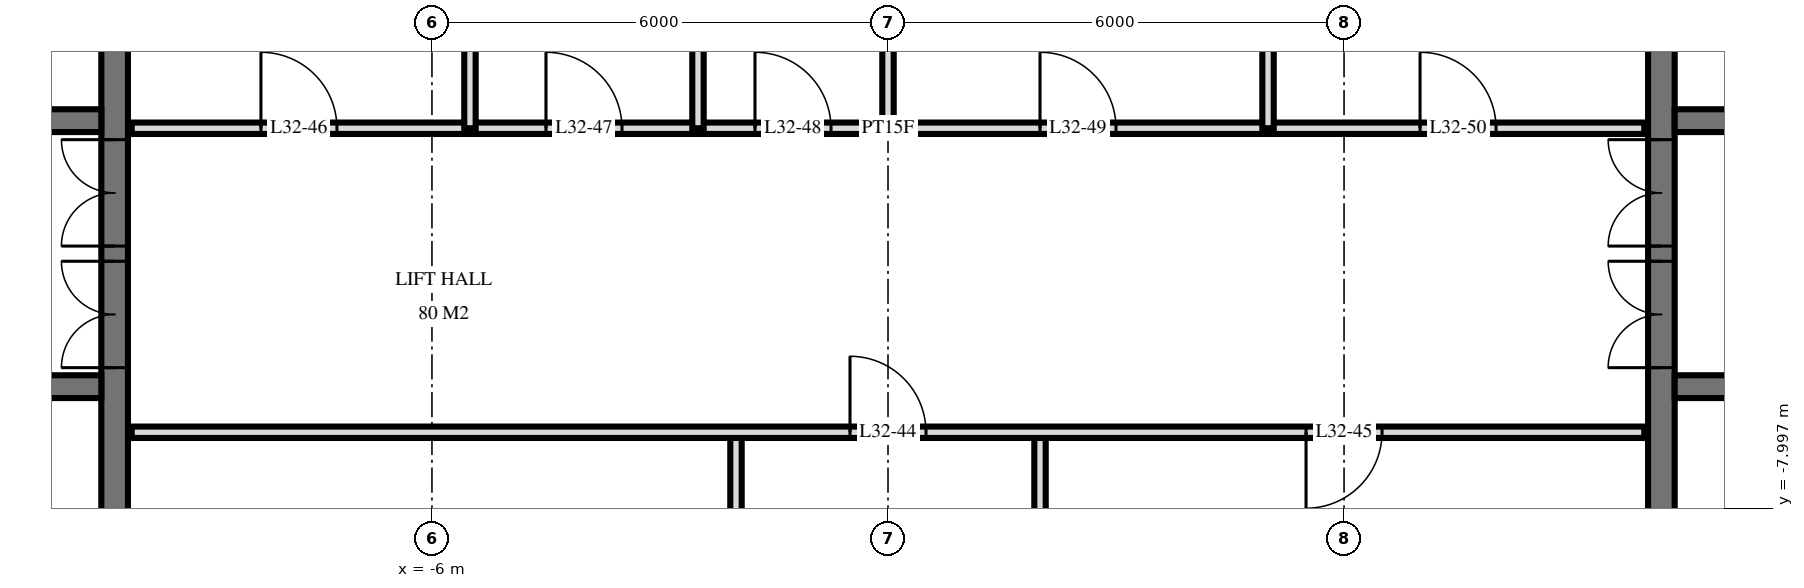
"""IFC4 building model, lengths in metres.
Left out: names, types, materials, properties, quantities, classifications, styles, units other than length and angle.
Written with IfcOpenShell. Run it as: python <this file> out.ifc"""

import sys

from ifc_helpers import new_model, si_unit, direction, frame, frame_2d, origin, place, context, subcontext, project, spatial, rectangle, extrude, element, fill, save


model = new_model("IFC4")
c1 = context("Model", 3, precision=1e-05, world=origin(), true_north=direction((0.0, 1.0)))
c2 = subcontext(c1, "Body", "Model", "MODEL_VIEW")
j1 = project(units=[si_unit("LENGTHUNIT", "METRE"), si_unit("PLANEANGLEUNIT", "RADIAN")], contexts=[c1])
p1 = place(None, origin())
s1 = spatial("IfcSite", under=j1, at=p1, CompositionType="ELEMENT")
p2 = place(p1, origin())
s2 = spatial("IfcBuilding", under=s1, at=p2, CompositionType="ELEMENT")
p3 = place(p2, frame((0.0, 0.0, 127.2)))
s3 = spatial("IfcBuildingStorey", under=s2, at=p3, CompositionType="ELEMENT", Elevation=127.2)
p4 = place(p3, frame((-10.175, -14.55, 0.0), z_axis=(0.0, 0.0, 1.0), x_axis=(0.0, 1.0, 0.0)))
e1 = element("IfcWall", 1, at=p4, inside=s3, PredefinedType="SHEAR", context=c2, shape_type="SweptSolid", body=[
    extrude(rectangle(XDim=14.1, YDim=0.35, at=frame_2d((7.05, 0.0))), origin(), (0.0, 0.0, 1.0), 3.6),
])
p5 = place(p4, frame((8.4, 0.0, 0.0)))
e2 = element("IfcOpeningElement", 2, at=p5, cuts=e1, PredefinedType="OPENING", context=c2, shape_type="SweptSolid", body=[
    extrude(rectangle(XDim=1.4, YDim=2.4, at=frame_2d((0.7, 1.2))), frame((0.0, 0.185, 0.0), z_axis=(0.0, -1.0, 0.0), x_axis=(1.0, 0.0, 0.0)), (0.0, 0.0, 1.0), 0.37),
])
p6 = place(p4, frame((10.0, 0.0, 0.0)))
e3 = element("IfcOpeningElement", 3, at=p6, cuts=e1, PredefinedType="OPENING", context=c2, shape_type="SweptSolid", body=[
    extrude(rectangle(XDim=1.4, YDim=2.4, at=frame_2d((0.7, 1.2))), frame((0.0, 0.185, 0.0), z_axis=(0.0, -1.0, 0.0), x_axis=(1.0, 0.0, 0.0)), (0.0, 0.0, 1.0), 0.37),
])
p7 = place(p4, frame((4.0, 0.0, 0.0)))
e4 = element("IfcOpeningElement", 4, at=p7, cuts=e1, PredefinedType="OPENING", context=c2, shape_type="SweptSolid", body=[
    extrude(rectangle(XDim=1.2, YDim=2.1, at=frame_2d((0.6, 1.05))), frame((0.0, 0.185, 0.0), z_axis=(0.0, -1.0, 0.0), x_axis=(1.0, 0.0, 0.0)), (0.0, 0.0, 1.0), 0.37),
])
p8 = place(p3, frame((-24.05, -2.9, 0.0), z_axis=(0.0, 0.0, 1.0), x_axis=(1.0, 0.0, 0.0)))
e5 = element("IfcWall", 5, at=p8, inside=s3, PredefinedType="SHEAR", context=c2, shape_type="SweptSolid", body=[
    extrude(rectangle(XDim=13.7, YDim=0.3, at=frame_2d((6.85, 0.0))), origin(), (0.0, 0.0, 1.0), 3.6),
])
p9 = place(p8, frame((0.55, 0.0, 0.0)))
e6 = element("IfcOpeningElement", 6, at=p9, cuts=e5, PredefinedType="OPENING", context=c2, shape_type="SweptSolid", body=[
    extrude(rectangle(XDim=1.1, YDim=2.1, at=frame_2d((0.55, 1.05))), frame((0.0, 0.16, 0.0), z_axis=(0.0, -1.0, 0.0), x_axis=(1.0, 0.0, 0.0)), (0.0, 0.0, 1.0), 0.32),
])
p10 = place(p8, frame((6.863, 0.0, 0.0)))
e7 = element("IfcOpeningElement", 7, at=p10, cuts=e5, PredefinedType="OPENING", context=c2, shape_type="SweptSolid", body=[
    extrude(rectangle(XDim=0.9, YDim=2.1, at=frame_2d((0.45, 1.05))), frame((0.0, 0.16, 0.0), z_axis=(0.0, -1.0, 0.0), x_axis=(1.0, 0.0, 0.0)), (0.0, 0.0, 1.0), 0.32),
])
p11 = place(p8, frame((5.438, 0.0, 0.0)))
e8 = element("IfcOpeningElement", 8, at=p11, cuts=e5, PredefinedType="OPENING", context=c2, shape_type="SweptSolid", body=[
    extrude(rectangle(XDim=0.9, YDim=2.1, at=frame_2d((0.45, 1.05))), frame((0.0, 0.16, 0.0), z_axis=(0.0, -1.0, 0.0), x_axis=(1.0, 0.0, 0.0)), (0.0, 0.0, 1.0), 0.32),
])
p12 = place(p8, frame((11.85, 0.0, 0.0)))
e9 = element("IfcOpeningElement", 9, at=p12, cuts=e5, PredefinedType="OPENING", context=c2, shape_type="SweptSolid", body=[
    extrude(rectangle(XDim=1.0, YDim=2.1, at=frame_2d((0.5, 1.05))), frame((0.0, 0.16, 0.0), z_axis=(0.0, -1.0, 0.0), x_axis=(1.0, 0.0, 0.0)), (0.0, 0.0, 1.0), 0.32),
])
p13 = place(p8, frame((9.562, 0.0, 0.0)))
e10 = element("IfcOpeningElement", 10, at=p13, cuts=e5, PredefinedType="OPENING", context=c2, shape_type="SweptSolid", body=[
    extrude(rectangle(XDim=1.0, YDim=2.1, at=frame_2d((0.5, 1.05))), frame((0.0, 0.16, 0.0), z_axis=(0.0, -1.0, 0.0), x_axis=(1.0, 0.0, 0.0)), (0.0, 0.0, 1.0), 0.32),
])
p14 = place(p8, frame((8.137, 0.0, 0.0)))
e11 = element("IfcOpeningElement", 11, at=p14, cuts=e5, PredefinedType="OPENING", context=c2, shape_type="SweptSolid", body=[
    extrude(rectangle(XDim=1.0, YDim=2.1, at=frame_2d((0.5, 1.05))), frame((0.0, 0.16, 0.0), z_axis=(0.0, -1.0, 0.0), x_axis=(1.0, 0.0, 0.0)), (0.0, 0.0, 1.0), 0.32),
])
p15 = place(p8, frame((3.0, 0.0, 0.0)))
e12 = element("IfcOpeningElement", 12, at=p15, cuts=e5, PredefinedType="OPENING", context=c2, shape_type="SweptSolid", body=[
    extrude(rectangle(XDim=1.0, YDim=2.1, at=frame_2d((0.5, 1.05))), frame((0.0, 0.16, 0.0), z_axis=(0.0, -1.0, 0.0), x_axis=(1.0, 0.0, 0.0)), (0.0, 0.0, 1.0), 0.32),
])
p16 = place(p3, frame((-24.05, -6.4, 0.0), z_axis=(0.0, 0.0, 1.0), x_axis=(1.0, 0.0, 0.0)))
e13 = element("IfcWall", 13, at=p16, inside=s3, PredefinedType="SHEAR", context=c2, shape_type="SweptSolid", body=[
    extrude(rectangle(XDim=13.7, YDim=0.3, at=frame_2d((6.85, 0.0))), origin(), (0.0, 0.0, 1.0), 3.6),
])
p17 = place(p16, frame((0.55, 0.0, 0.0)))
e14 = element("IfcOpeningElement", 14, at=p17, cuts=e13, PredefinedType="OPENING", context=c2, shape_type="SweptSolid", body=[
    extrude(rectangle(XDim=1.1, YDim=2.1, at=frame_2d((0.55, 1.05))), frame((0.0, 0.16, 0.0), z_axis=(0.0, -1.0, 0.0), x_axis=(1.0, 0.0, 0.0)), (0.0, 0.0, 1.0), 0.32),
])
p18 = place(p16, frame((5.8, 0.0, 0.0)))
e15 = element("IfcOpeningElement", 15, at=p18, cuts=e13, PredefinedType="OPENING", context=c2, shape_type="SweptSolid", body=[
    extrude(rectangle(XDim=1.1, YDim=2.1, at=frame_2d((0.55, 1.05))), frame((0.0, 0.16, 0.0), z_axis=(0.0, -1.0, 0.0), x_axis=(1.0, 0.0, 0.0)), (0.0, 0.0, 1.0), 0.32),
])
p19 = place(p3, frame((10.175, -14.55, 0.0), z_axis=(0.0, 0.0, 1.0), x_axis=(0.0, 1.0, 0.0)))
e16 = element("IfcWall", 16, at=p19, inside=s3, PredefinedType="SHEAR", context=c2, shape_type="SweptSolid", body=[
    extrude(rectangle(XDim=14.1, YDim=0.35, at=frame_2d((7.05, 0.0))), origin(), (0.0, 0.0, 1.0), 3.6),
])
p20 = place(p19, frame((8.4, 0.0, 0.0)))
e17 = element("IfcOpeningElement", 17, at=p20, cuts=e16, PredefinedType="OPENING", context=c2, shape_type="SweptSolid", body=[
    extrude(rectangle(XDim=1.4, YDim=2.4, at=frame_2d((0.7, 1.2))), frame((0.0, 0.185, 0.0), z_axis=(0.0, -1.0, 0.0), x_axis=(1.0, 0.0, 0.0)), (0.0, 0.0, 1.0), 0.37),
])
p21 = place(p19, frame((10.0, 0.0, 0.0)))
e18 = element("IfcOpeningElement", 18, at=p21, cuts=e16, PredefinedType="OPENING", context=c2, shape_type="SweptSolid", body=[
    extrude(rectangle(XDim=1.4, YDim=2.4, at=frame_2d((0.7, 1.2))), frame((0.0, 0.185, 0.0), z_axis=(0.0, -1.0, 0.0), x_axis=(1.0, 0.0, 0.0)), (0.0, 0.0, 1.0), 0.37),
])
p22 = place(p19, frame((4.0, 0.0, 0.0)))
e19 = element("IfcOpeningElement", 19, at=p22, cuts=e16, PredefinedType="OPENING", context=c2, shape_type="SweptSolid", body=[
    extrude(rectangle(XDim=1.2, YDim=2.1, at=frame_2d((0.6, 1.05))), frame((0.0, 0.185, 0.0), z_axis=(0.0, -1.0, 0.0), x_axis=(1.0, 0.0, 0.0)), (0.0, 0.0, 1.0), 0.37),
])
p23 = place(p3, frame((10.35, -2.9, 0.0), z_axis=(0.0, 0.0, 1.0), x_axis=(1.0, 0.0, 0.0)))
e20 = element("IfcWall", 20, at=p23, inside=s3, PredefinedType="SHEAR", context=c2, shape_type="SweptSolid", body=[
    extrude(rectangle(XDim=13.7, YDim=0.3, at=frame_2d((6.85, 0.0))), origin(), (0.0, 0.0, 1.0), 3.6),
])
p24 = place(p23, frame((12.05, 0.0, 0.0)))
e21 = element("IfcOpeningElement", 21, at=p24, cuts=e20, PredefinedType="OPENING", context=c2, shape_type="SweptSolid", body=[
    extrude(rectangle(XDim=1.1, YDim=2.1, at=frame_2d((0.55, 1.05))), frame((0.0, 0.16, 0.0), z_axis=(0.0, -1.0, 0.0), x_axis=(1.0, 0.0, 0.0)), (0.0, 0.0, 1.0), 0.32),
])
p25 = place(p23, frame((5.938, 0.0, 0.0)))
e22 = element("IfcOpeningElement", 22, at=p25, cuts=e20, PredefinedType="OPENING", context=c2, shape_type="SweptSolid", body=[
    extrude(rectangle(XDim=0.9, YDim=2.1, at=frame_2d((0.45, 1.05))), frame((0.0, 0.16, 0.0), z_axis=(0.0, -1.0, 0.0), x_axis=(1.0, 0.0, 0.0)), (0.0, 0.0, 1.0), 0.32),
])
p26 = place(p23, frame((7.363, 0.0, 0.0)))
e23 = element("IfcOpeningElement", 23, at=p26, cuts=e20, PredefinedType="OPENING", context=c2, shape_type="SweptSolid", body=[
    extrude(rectangle(XDim=0.9, YDim=2.1, at=frame_2d((0.45, 1.05))), frame((0.0, 0.16, 0.0), z_axis=(0.0, -1.0, 0.0), x_axis=(1.0, 0.0, 0.0)), (0.0, 0.0, 1.0), 0.32),
])
p27 = place(p23, frame((0.85, 0.0, 0.0)))
e24 = element("IfcOpeningElement", 24, at=p27, cuts=e20, PredefinedType="OPENING", context=c2, shape_type="SweptSolid", body=[
    extrude(rectangle(XDim=1.0, YDim=2.1, at=frame_2d((0.5, 1.05))), frame((0.0, 0.16, 0.0), z_axis=(0.0, -1.0, 0.0), x_axis=(1.0, 0.0, 0.0)), (0.0, 0.0, 1.0), 0.32),
])
p28 = place(p23, frame((3.137, 0.0, 0.0)))
e25 = element("IfcOpeningElement", 25, at=p28, cuts=e20, PredefinedType="OPENING", context=c2, shape_type="SweptSolid", body=[
    extrude(rectangle(XDim=1.0, YDim=2.1, at=frame_2d((0.5, 1.05))), frame((0.0, 0.16, 0.0), z_axis=(0.0, -1.0, 0.0), x_axis=(1.0, 0.0, 0.0)), (0.0, 0.0, 1.0), 0.32),
])
p29 = place(p23, frame((4.562, 0.0, 0.0)))
e26 = element("IfcOpeningElement", 26, at=p29, cuts=e20, PredefinedType="OPENING", context=c2, shape_type="SweptSolid", body=[
    extrude(rectangle(XDim=1.0, YDim=2.1, at=frame_2d((0.5, 1.05))), frame((0.0, 0.16, 0.0), z_axis=(0.0, -1.0, 0.0), x_axis=(1.0, 0.0, 0.0)), (0.0, 0.0, 1.0), 0.32),
])
p30 = place(p23, frame((9.7, 0.0, 0.0)))
e27 = element("IfcOpeningElement", 27, at=p30, cuts=e20, PredefinedType="OPENING", context=c2, shape_type="SweptSolid", body=[
    extrude(rectangle(XDim=1.0, YDim=2.1, at=frame_2d((0.5, 1.05))), frame((0.0, 0.16, 0.0), z_axis=(0.0, -1.0, 0.0), x_axis=(1.0, 0.0, 0.0)), (0.0, 0.0, 1.0), 0.32),
])
p31 = place(p3, frame((10.35, -6.4, 0.0), z_axis=(0.0, 0.0, 1.0), x_axis=(1.0, 0.0, 0.0)))
e28 = element("IfcWall", 28, at=p31, inside=s3, PredefinedType="SHEAR", context=c2, shape_type="SweptSolid", body=[
    extrude(rectangle(XDim=13.7, YDim=0.3, at=frame_2d((6.85, 0.0))), origin(), (0.0, 0.0, 1.0), 3.6),
])
p32 = place(p31, frame((12.05, 0.0, 0.0)))
e29 = element("IfcOpeningElement", 29, at=p32, cuts=e28, PredefinedType="OPENING", context=c2, shape_type="SweptSolid", body=[
    extrude(rectangle(XDim=1.1, YDim=2.1, at=frame_2d((0.55, 1.05))), frame((0.0, 0.16, 0.0), z_axis=(0.0, -1.0, 0.0), x_axis=(1.0, 0.0, 0.0)), (0.0, 0.0, 1.0), 0.32),
])
p33 = place(p31, frame((6.8, 0.0, 0.0)))
e30 = element("IfcOpeningElement", 30, at=p33, cuts=e28, PredefinedType="OPENING", context=c2, shape_type="SweptSolid", body=[
    extrude(rectangle(XDim=1.1, YDim=2.1, at=frame_2d((0.55, 1.05))), frame((0.0, 0.16, 0.0), z_axis=(0.0, -1.0, 0.0), x_axis=(1.0, 0.0, 0.0)), (0.0, 0.0, 1.0), 0.32),
])
p34 = place(p3, frame((5.0, -3.0, 0.0), z_axis=(0.0, 0.0, 1.0), x_axis=(0.0, 1.0, 0.0)))
e31 = element("IfcWall", 31, at=p34, inside=s3, PredefinedType="PARTITIONING", context=c2, shape_type="SweptSolid", body=[
    extrude(rectangle(XDim=4.02, YDim=0.15, at=frame_2d((2.01, 0.0))), origin(), (0.0, 0.0, 1.0), 3.32),
])
p35 = place(p3, frame((2.0, -11.0, 0.0), z_axis=(0.0, 0.0, 1.0), x_axis=(0.0, 1.0, 0.0)))
e32 = element("IfcWall", 32, at=p35, inside=s3, PredefinedType="PARTITIONING", context=c2, shape_type="SweptSolid", body=[
    extrude(rectangle(XDim=4.0, YDim=0.15, at=frame_2d((2.0, 0.0))), origin(), (0.0, 0.0, 1.0), 3.32),
])
p36 = place(p3, frame((0.0, -3.0, 0.0), z_axis=(0.0, 0.0, 1.0), x_axis=(0.0, 1.0, 0.0)))
e33 = element("IfcWall", 33, at=p36, inside=s3, PredefinedType="PLUMBINGWALL", context=c2, shape_type="SweptSolid", body=[
    extrude(rectangle(XDim=4.02, YDim=0.15, at=frame_2d((2.01, 0.0))), origin(), (0.0, 0.0, 1.0), 3.32),
])
p37 = place(p3, frame((-2.0, -11.0, 0.0), z_axis=(0.0, 0.0, 1.0), x_axis=(0.0, 1.0, 0.0)))
e34 = element("IfcWall", 34, at=p37, inside=s3, PredefinedType="PARTITIONING", context=c2, shape_type="SweptSolid", body=[
    extrude(rectangle(XDim=4.0, YDim=0.15, at=frame_2d((2.0, 0.0))), origin(), (0.0, 0.0, 1.0), 3.32),
])
for number, where, z_axis, x_axis in (
    (35, (-2.5, -3.0, 0.0), (0.0, 0.0, 1.0), (0.0, 1.0, 0.0)),
    (36, (-5.5, -3.0, 0.0), (0.0, 0.0, 1.0), (0.0, 1.0, 0.0)),
):
    element("IfcWall", number, at=place(p3, frame(where, z_axis=z_axis, x_axis=x_axis)), inside=s3, PredefinedType="PLUMBINGWALL", context=c2, shape_type="SweptSolid", body=[
        extrude(rectangle(XDim=4.02, YDim=0.15, at=frame_2d((2.01, 0.0))), origin(), (0.0, 0.0, 1.0), 3.32),
    ])
p38 = place(p3, frame((-9.95, -7.0, 0.0), z_axis=(0.0, 0.0, 1.0), x_axis=(1.0, 0.0, 0.0)))
e37 = element("IfcWall", 37, at=p38, inside=s3, PredefinedType="PARTITIONING", context=c2, shape_type="SweptSolid", body=[
    extrude(rectangle(XDim=19.9, YDim=0.15, at=frame_2d((9.95, 0.0))), origin(), (0.0, 0.0, 1.0), 3.32),
])
p39 = place(p38, frame((9.45, 0.0, 0.0)))
e38 = element("IfcOpeningElement", 38, at=p39, cuts=e37, PredefinedType="OPENING", context=c2, shape_type="SweptSolid", body=[
    extrude(rectangle(XDim=1.0, YDim=2.1, at=frame_2d((0.5, 1.05))), frame((0.0, 0.085, 0.0), z_axis=(0.0, -1.0, 0.0), x_axis=(1.0, 0.0, 0.0)), (0.0, 0.0, 1.0), 0.17),
])
p40 = place(p38, frame((15.45, 0.0, 0.0)))
e39 = element("IfcOpeningElement", 39, at=p40, cuts=e37, PredefinedType="OPENING", context=c2, shape_type="SweptSolid", body=[
    extrude(rectangle(XDim=1.0, YDim=2.1, at=frame_2d((0.5, 1.05))), frame((0.0, 0.085, 0.0), z_axis=(0.0, -1.0, 0.0), x_axis=(1.0, 0.0, 0.0)), (0.0, 0.0, 1.0), 0.17),
])
p41 = place(p3, frame((-9.95, -3.0, 0.0), z_axis=(0.0, 0.0, 1.0), x_axis=(1.0, 0.0, 0.0)))
e40 = element("IfcWall", 40, at=p41, inside=s3, PredefinedType="PARTITIONING", context=c2, shape_type="SweptSolid", body=[
    extrude(rectangle(XDim=19.9, YDim=0.15, at=frame_2d((9.95, 0.0))), origin(), (0.0, 0.0, 1.0), 3.32),
])
p42 = place(p41, frame((1.7, 0.0, 0.0)))
e41 = element("IfcOpeningElement", 41, at=p42, cuts=e40, PredefinedType="OPENING", context=c2, shape_type="SweptSolid", body=[
    extrude(rectangle(XDim=1.0, YDim=2.1, at=frame_2d((0.5, 1.05))), frame((0.0, 0.085, 0.0), z_axis=(0.0, -1.0, 0.0), x_axis=(1.0, 0.0, 0.0)), (0.0, 0.0, 1.0), 0.17),
])
p43 = place(p41, frame((5.45, 0.0, 0.0)))
e42 = element("IfcOpeningElement", 42, at=p43, cuts=e40, PredefinedType="OPENING", context=c2, shape_type="SweptSolid", body=[
    extrude(rectangle(XDim=1.0, YDim=2.1, at=frame_2d((0.5, 1.05))), frame((0.0, 0.085, 0.0), z_axis=(0.0, -1.0, 0.0), x_axis=(1.0, 0.0, 0.0)), (0.0, 0.0, 1.0), 0.17),
])
p44 = place(p41, frame((8.2, 0.0, 0.0)))
e43 = element("IfcOpeningElement", 43, at=p44, cuts=e40, PredefinedType="OPENING", context=c2, shape_type="SweptSolid", body=[
    extrude(rectangle(XDim=1.0, YDim=2.1, at=frame_2d((0.5, 1.05))), frame((0.0, 0.085, 0.0), z_axis=(0.0, -1.0, 0.0), x_axis=(1.0, 0.0, 0.0)), (0.0, 0.0, 1.0), 0.17),
])
p45 = place(p41, frame((11.95, 0.0, 0.0)))
e44 = element("IfcOpeningElement", 44, at=p45, cuts=e40, PredefinedType="OPENING", context=c2, shape_type="SweptSolid", body=[
    extrude(rectangle(XDim=1.0, YDim=2.1, at=frame_2d((0.5, 1.05))), frame((0.0, 0.085, 0.0), z_axis=(0.0, -1.0, 0.0), x_axis=(1.0, 0.0, 0.0)), (0.0, 0.0, 1.0), 0.17),
])
p46 = place(p41, frame((16.95, 0.0, 0.0)))
e45 = element("IfcOpeningElement", 45, at=p46, cuts=e40, PredefinedType="OPENING", context=c2, shape_type="SweptSolid", body=[
    extrude(rectangle(XDim=1.0, YDim=2.1, at=frame_2d((0.5, 1.05))), frame((0.0, 0.085, 0.0), z_axis=(0.0, -1.0, 0.0), x_axis=(1.0, 0.0, 0.0)), (0.0, 0.0, 1.0), 0.17),
])
p47 = place(p5, origin())
e46 = element("IfcDoor", 46, at=p47, inside=s3, OperationType="DOUBLE_DOOR_SINGLE_SWING", PredefinedType="DOOR", context=c2, shape_type="SweptSolid", body=[
    extrude(rectangle(XDim=1.4, YDim=2.4, at=frame_2d((0.7, 1.2))), frame((0.0, 0.025, 0.0), z_axis=(0.0, -1.0, 0.0), x_axis=(1.0, 0.0, 0.0)), (0.0, 0.0, 1.0), 0.05),
])
fill(e2, e46)
p48 = place(p6, origin())
e47 = element("IfcDoor", 47, at=p48, inside=s3, OperationType="DOUBLE_DOOR_SINGLE_SWING", PredefinedType="DOOR", context=c2, shape_type="SweptSolid", body=[
    extrude(rectangle(XDim=1.4, YDim=2.4, at=frame_2d((0.7, 1.2))), frame((0.0, 0.025, 0.0), z_axis=(0.0, -1.0, 0.0), x_axis=(1.0, 0.0, 0.0)), (0.0, 0.0, 1.0), 0.05),
])
fill(e3, e47)
p49 = place(p20, origin())
e48 = element("IfcDoor", 48, at=p49, inside=s3, OperationType="DOUBLE_DOOR_SINGLE_SWING", PredefinedType="DOOR", context=c2, shape_type="SweptSolid", body=[
    extrude(rectangle(XDim=1.4, YDim=2.4, at=frame_2d((0.7, 1.2))), frame((0.0, 0.025, 0.0), z_axis=(0.0, -1.0, 0.0), x_axis=(1.0, 0.0, 0.0)), (0.0, 0.0, 1.0), 0.05),
])
fill(e17, e48)
p50 = place(p21, origin())
e49 = element("IfcDoor", 49, at=p50, inside=s3, OperationType="DOUBLE_DOOR_SINGLE_SWING", PredefinedType="DOOR", context=c2, shape_type="SweptSolid", body=[
    extrude(rectangle(XDim=1.4, YDim=2.4, at=frame_2d((0.7, 1.2))), frame((0.0, 0.025, 0.0), z_axis=(0.0, -1.0, 0.0), x_axis=(1.0, 0.0, 0.0)), (0.0, 0.0, 1.0), 0.05),
])
fill(e18, e49)
p51 = place(p39, origin())
e50 = element("IfcDoor", 50, at=p51, inside=s3, OperationType="SINGLE_SWING_RIGHT", PredefinedType="DOOR", context=c2, shape_type="SweptSolid", body=[
    extrude(rectangle(XDim=1.0, YDim=2.1, at=frame_2d((0.5, 1.05))), frame((0.0, 0.025, 0.0), z_axis=(0.0, -1.0, 0.0), x_axis=(1.0, 0.0, 0.0)), (0.0, 0.0, 1.0), 0.05),
])
fill(e38, e50)
p52 = place(p40, frame((0.5, 0.0, 0.0), z_axis=(0.0, 0.0, 1.0), x_axis=(-1.0, 0.0, 0.0)))
e51 = element("IfcDoor", 51, at=p52, inside=s3, OperationType="SINGLE_SWING_LEFT", PredefinedType="DOOR", context=c2, shape_type="SweptSolid", body=[
    extrude(rectangle(XDim=1.0, YDim=2.1, at=frame_2d((0.0, 1.05))), frame((0.0, -0.025, 0.0), z_axis=(0.0, 1.0, 0.0), x_axis=(-1.0, 0.0, 0.0)), (0.0, 0.0, 1.0), 0.05),
])
fill(e39, e51)
p53 = place(p42, origin())
e52 = element("IfcDoor", 52, at=p53, inside=s3, OperationType="SINGLE_SWING_RIGHT", PredefinedType="DOOR", context=c2, shape_type="SweptSolid", body=[
    extrude(rectangle(XDim=1.0, YDim=2.1, at=frame_2d((0.5, 1.05))), frame((0.0, 0.025, 0.0), z_axis=(0.0, -1.0, 0.0), x_axis=(1.0, 0.0, 0.0)), (0.0, 0.0, 1.0), 0.05),
])
fill(e41, e52)
p54 = place(p43, origin())
e53 = element("IfcDoor", 53, at=p54, inside=s3, OperationType="SINGLE_SWING_RIGHT", PredefinedType="DOOR", context=c2, shape_type="SweptSolid", body=[
    extrude(rectangle(XDim=1.0, YDim=2.1, at=frame_2d((0.5, 1.05))), frame((0.0, 0.025, 0.0), z_axis=(0.0, -1.0, 0.0), x_axis=(1.0, 0.0, 0.0)), (0.0, 0.0, 1.0), 0.05),
])
fill(e42, e53)
p55 = place(p44, origin())
e54 = element("IfcDoor", 54, at=p55, inside=s3, OperationType="SINGLE_SWING_RIGHT", PredefinedType="DOOR", context=c2, shape_type="SweptSolid", body=[
    extrude(rectangle(XDim=1.0, YDim=2.1, at=frame_2d((0.5, 1.05))), frame((0.0, 0.025, 0.0), z_axis=(0.0, -1.0, 0.0), x_axis=(1.0, 0.0, 0.0)), (0.0, 0.0, 1.0), 0.05),
])
fill(e43, e54)
p56 = place(p45, origin())
e55 = element("IfcDoor", 55, at=p56, inside=s3, OperationType="SINGLE_SWING_RIGHT", PredefinedType="DOOR", context=c2, shape_type="SweptSolid", body=[
    extrude(rectangle(XDim=1.0, YDim=2.1, at=frame_2d((0.5, 1.05))), frame((0.0, 0.025, 0.0), z_axis=(0.0, -1.0, 0.0), x_axis=(1.0, 0.0, 0.0)), (0.0, 0.0, 1.0), 0.05),
])
fill(e44, e55)
p57 = place(p46, origin())
e56 = element("IfcDoor", 56, at=p57, inside=s3, OperationType="SINGLE_SWING_RIGHT", PredefinedType="DOOR", context=c2, shape_type="SweptSolid", body=[
    extrude(rectangle(XDim=1.0, YDim=2.1, at=frame_2d((0.5, 1.05))), frame((0.0, 0.025, 0.0), z_axis=(0.0, -1.0, 0.0), x_axis=(1.0, 0.0, 0.0)), (0.0, 0.0, 1.0), 0.05),
])
fill(e45, e56)
save(model, sys.argv[1])
